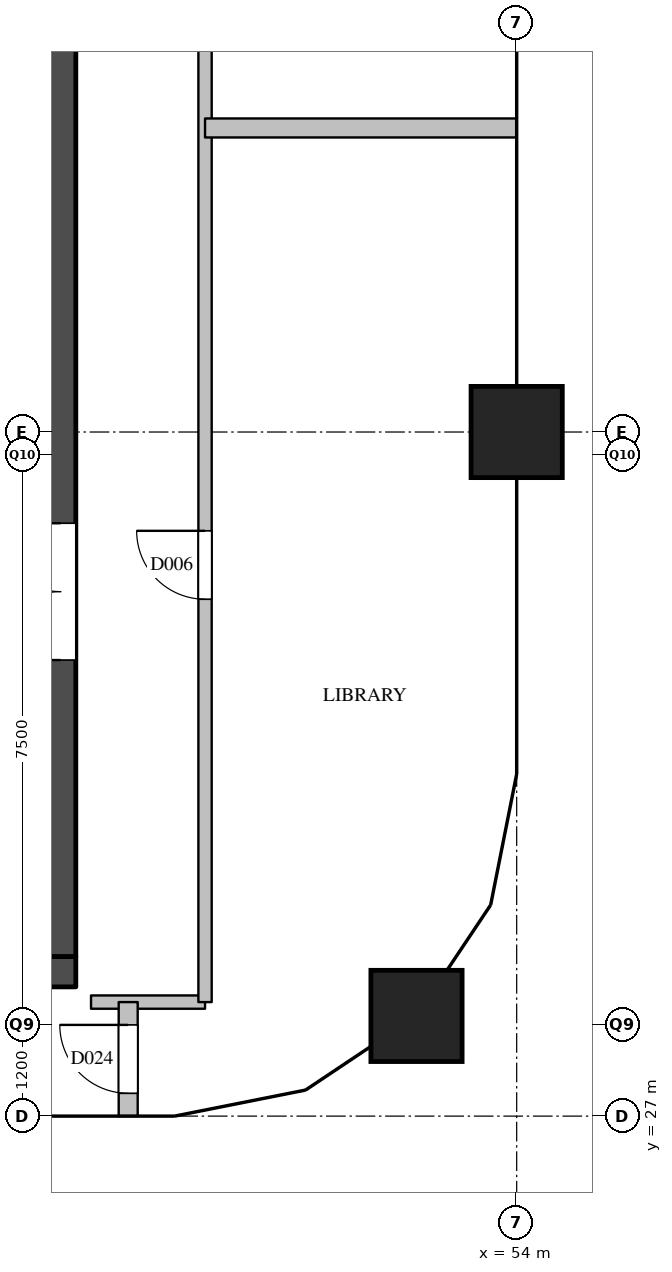
"""IFC4 building model, lengths in metres.
Left out: names, types, materials, properties, quantities, classifications, styles, units other than length and angle.
Written with IfcOpenShell. Run it as: python <this file> out.ifc"""

import sys

from ifc_helpers import new_model, si_unit, direction, frame, frame_2d, origin, origin_2d, place, context, subcontext, project, spatial, rectangle, extrude, element, fill, save


model = new_model("IFC4")
c1 = context("Model", 3, precision=1e-05, world=origin(), true_north=direction((0.0, 1.0)))
c2 = subcontext(c1, "Body", "Model", "MODEL_VIEW")
j1 = project(units=[si_unit("LENGTHUNIT", "METRE"), si_unit("PLANEANGLEUNIT", "RADIAN")], contexts=[c1])
p1 = place(None, origin())
s1 = spatial("IfcSite", under=j1, at=p1, CompositionType="ELEMENT")
p2 = place(p1, origin())
s2 = spatial("IfcBuilding", under=s1, at=p2, CompositionType="ELEMENT")
p3 = place(p2, frame((0.0, 0.0, 242.3)))
s3 = spatial("IfcBuildingStorey", under=s2, at=p3, CompositionType="ELEMENT", Elevation=242.3)
for number, where, z_axis, x_axis in (
    (1, (52.682, 28.318, 0.0), (0.0, 0.0, 1.0), (1.0, 0.0, 0.0)),
    (2, (54.0, 36.0, 0.0), (0.0, 0.0, 1.0), (1.0, 0.0, 0.0)),
):
    element("IfcColumn", number, at=place(p3, frame(where, z_axis=z_axis, x_axis=x_axis)), inside=s3, PredefinedType="COLUMN", context=c2, shape_type="SweptSolid", body=[
        extrude(rectangle(XDim=1.2, YDim=1.2, at=origin_2d()), origin(), (0.0, 0.0, 1.0), 3.9),
    ])
p4 = place(p3, frame((36.2, 28.9, 0.0), z_axis=(0.0, 0.0, 1.0), x_axis=(1.0, 0.0, 0.0)))
e3 = element("IfcWall", 3, at=p4, inside=s3, PredefinedType="SHEAR", context=c2, shape_type="SweptSolid", body=[
    extrude(rectangle(XDim=12.0, YDim=0.4, at=frame_2d((6.0, 0.0))), origin(), (0.0, 0.0, 1.0), 3.6),
])
p5 = place(p4, frame((0.85, 0.0, 0.0)))
e4 = element("IfcOpeningElement", 4, at=p5, cuts=e3, PredefinedType="OPENING", context=c2, shape_type="SweptSolid", body=[
    extrude(rectangle(XDim=1.2, YDim=2.1, at=frame_2d((0.6, 1.05))), frame((0.0, 0.21, 0.0), z_axis=(0.0, -1.0, 0.0), x_axis=(1.0, 0.0, 0.0)), (0.0, 0.0, 1.0), 0.42),
])
p6 = place(p4, frame((2.95, 0.0, 0.0)))
e5 = element("IfcOpeningElement", 5, at=p6, cuts=e3, PredefinedType="OPENING", context=c2, shape_type="SweptSolid", body=[
    extrude(rectangle(XDim=1.2, YDim=2.1, at=frame_2d((0.6, 1.05))), frame((0.0, 0.21, 0.0), z_axis=(0.0, -1.0, 0.0), x_axis=(1.0, 0.0, 0.0)), (0.0, 0.0, 1.0), 0.42),
])
p7 = place(p4, frame((5.05, 0.0, 0.0)))
e6 = element("IfcOpeningElement", 6, at=p7, cuts=e3, PredefinedType="OPENING", context=c2, shape_type="SweptSolid", body=[
    extrude(rectangle(XDim=1.2, YDim=2.1, at=frame_2d((0.6, 1.05))), frame((0.0, 0.21, 0.0), z_axis=(0.0, -1.0, 0.0), x_axis=(1.0, 0.0, 0.0)), (0.0, 0.0, 1.0), 0.42),
])
p8 = place(p3, frame((48.0, 29.1, 0.0), z_axis=(0.0, 0.0, 1.0), x_axis=(0.0, 1.0, 0.0)))
e7 = element("IfcWall", 7, at=p8, inside=s3, PredefinedType="SHEAR", context=c2, shape_type="SweptSolid", body=[
    extrude(rectangle(XDim=20.3, YDim=0.4, at=frame_2d((10.15, 0.0))), origin(), (0.0, 0.0, 1.0), 3.6),
])
p9 = place(p8, frame((12.5, 0.0, 0.0)))
e8 = element("IfcOpeningElement", 8, at=p9, cuts=e7, PredefinedType="OPENING", context=c2, shape_type="SweptSolid", body=[
    extrude(rectangle(XDim=0.7, YDim=2.1, at=frame_2d((0.35, 1.05))), frame((0.0, 0.21, 0.0), z_axis=(0.0, -1.0, 0.0), x_axis=(1.0, 0.0, 0.0)), (0.0, 0.0, 1.0), 0.42),
])
p10 = place(p8, frame((3.9, 0.0, 0.0)))
e9 = element("IfcOpeningElement", 9, at=p10, cuts=e7, PredefinedType="OPENING", context=c2, shape_type="SweptSolid", body=[
    extrude(rectangle(XDim=1.8, YDim=2.1, at=frame_2d((0.9, 1.05))), frame((0.0, 0.21, 0.0), z_axis=(0.0, -1.0, 0.0), x_axis=(1.0, 0.0, 0.0)), (0.0, 0.0, 1.0), 0.42),
])
p11 = place(p3, frame((48.4, 28.5, 0.0), z_axis=(0.0, 0.0, 1.0), x_axis=(1.0, 0.0, 0.0)))
e10 = element("IfcWall", 10, at=p11, inside=s3, PredefinedType="PARTITIONING", context=c2, shape_type="SweptSolid", body=[
    extrude(rectangle(XDim=1.5, YDim=0.175, at=frame_2d((0.75, 0.0))), origin(), (0.0, 0.0, 1.0), 3.6),
])
p12 = place(p3, frame((49.9, 28.5, 0.0), z_axis=(0.0, 0.0, 1.0), x_axis=(0.0, 1.0, 0.0)))
e11 = element("IfcWall", 11, at=p12, inside=s3, PredefinedType="PARTITIONING", context=c2, shape_type="SweptSolid", body=[
    extrude(rectangle(XDim=23.0, YDim=0.175, at=frame_2d((11.5, 0.0))), origin(), (0.0, 0.0, 1.0), 3.6),
])
p13 = place(p12, frame((5.3, 0.0, 0.0)))
e12 = element("IfcOpeningElement", 12, at=p13, cuts=e11, PredefinedType="OPENING", context=c2, shape_type="SweptSolid", body=[
    extrude(rectangle(XDim=0.9, YDim=2.1, at=frame_2d((0.45, 1.05))), frame((0.0, 0.097, 0.0), z_axis=(0.0, -1.0, 0.0), x_axis=(1.0, 0.0, 0.0)), (0.0, 0.0, 1.0), 0.195),
])
p14 = place(p12, frame((16.05, 0.0, 0.0)))
e13 = element("IfcOpeningElement", 13, at=p14, cuts=e11, PredefinedType="OPENING", context=c2, shape_type="SweptSolid", body=[
    extrude(rectangle(XDim=0.9, YDim=2.1, at=frame_2d((0.45, 1.05))), frame((0.0, 0.097, 0.0), z_axis=(0.0, -1.0, 0.0), x_axis=(1.0, 0.0, 0.0)), (0.0, 0.0, 1.0), 0.195),
])
p15 = place(p3, frame((49.9, 40.0, 0.0), z_axis=(0.0, 0.0, 1.0), x_axis=(1.0, 0.0, 0.0)))
e14 = element("IfcWall", 14, at=p15, inside=s3, PredefinedType="PARTITIONING", context=c2, shape_type="SweptSolid", body=[
    extrude(rectangle(XDim=4.1, YDim=0.25, at=frame_2d((2.05, 0.0))), origin(), (0.0, 0.0, 1.0), 2.6),
])
p16 = place(p3, frame((48.889, 27.0, 0.0), z_axis=(0.0, 0.0, 1.0), x_axis=(0.0, 1.0, 0.0)))
e15 = element("IfcWall", 15, at=p16, inside=s3, PredefinedType="PARTITIONING", context=c2, shape_type="SweptSolid", body=[
    extrude(rectangle(XDim=1.5, YDim=0.25, at=frame_2d((0.75, 0.0))), origin(), (0.0, 0.0, 1.0), 2.6),
])
p17 = place(p16, frame((0.3, 0.0, 0.0)))
e16 = element("IfcOpeningElement", 16, at=p17, cuts=e15, PredefinedType="OPENING", context=c2, shape_type="SweptSolid", body=[
    extrude(rectangle(XDim=0.9, YDim=2.1, at=frame_2d((0.45, 1.05))), frame((0.0, 0.135, 0.0), z_axis=(0.0, -1.0, 0.0), x_axis=(1.0, 0.0, 0.0)), (0.0, 0.0, 1.0), 0.27),
])
p18 = place(p10, origin())
e17 = element("IfcDoor", 17, at=p18, inside=s3, OperationType="DOUBLE_DOOR_SINGLE_SWING", PredefinedType="DOOR", context=c2, shape_type="SweptSolid", body=[
    extrude(rectangle(XDim=1.8, YDim=2.1, at=frame_2d((0.9, 1.05))), frame((0.0, 0.025, 0.0), z_axis=(0.0, -1.0, 0.0), x_axis=(1.0, 0.0, 0.0)), (0.0, 0.0, 1.0), 0.05),
])
fill(e9, e17)
p19 = place(p13, origin())
e18 = element("IfcDoor", 18, at=p19, inside=s3, OperationType="SINGLE_SWING_RIGHT", PredefinedType="DOOR", context=c2, shape_type="SweptSolid", body=[
    extrude(rectangle(XDim=0.9, YDim=2.1, at=frame_2d((0.45, 1.05))), frame((0.0, 0.025, 0.0), z_axis=(0.0, -1.0, 0.0), x_axis=(1.0, 0.0, 0.0)), (0.0, 0.0, 1.0), 0.05),
])
fill(e12, e18)
p20 = place(p17, origin())
e19 = element("IfcDoor", 19, at=p20, inside=s3, OperationType="SINGLE_SWING_RIGHT", PredefinedType="DOOR", context=c2, shape_type="SweptSolid", body=[
    extrude(rectangle(XDim=0.9, YDim=2.1, at=frame_2d((0.45, 1.05))), frame((0.0, 0.025, 0.0), z_axis=(0.0, -1.0, 0.0), x_axis=(1.0, 0.0, 0.0)), (0.0, 0.0, 1.0), 0.05),
])
fill(e16, e19)
save(model, sys.argv[1])
